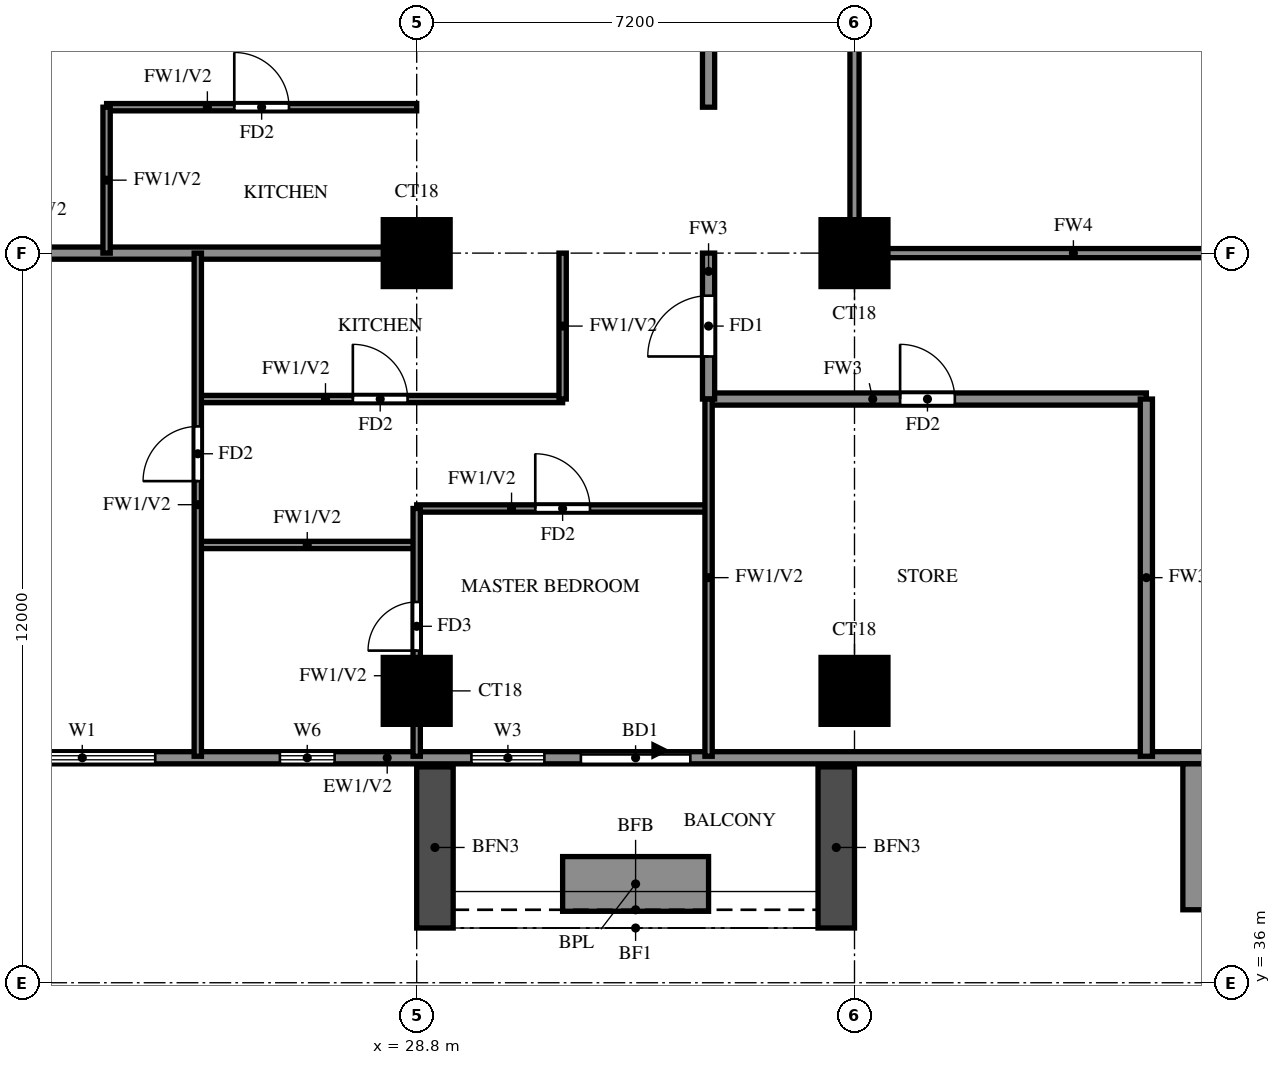
"""IFC4 building model, lengths in metres.
Left out: names, types, materials, properties, quantities, classifications, styles, units other than length and angle.
Written with IfcOpenShell. Run it as: python <this file> out.ifc"""

import sys

from ifc_helpers import new_model, si_unit, direction, frame, frame_2d, origin, origin_2d, place, context, subcontext, project, spatial, rectangle, extrude, source, transform, mapped, element, fill, save


model = new_model("IFC4")
c1 = context("Model", 3, precision=1e-05, world=origin(), true_north=direction((0.0, 1.0)))
c2 = subcontext(c1, "Body", "Model", "MODEL_VIEW")
j1 = project(units=[si_unit("LENGTHUNIT", "METRE"), si_unit("PLANEANGLEUNIT", "RADIAN")], contexts=[c1])
p1 = place(None, origin())
s1 = spatial("IfcSite", under=j1, at=p1, CompositionType="ELEMENT")
p2 = place(p1, origin())
s2 = spatial("IfcBuilding", under=s1, at=p2, CompositionType="ELEMENT")
p3 = place(p2, frame((0.0, 0.0, 127.0)))
s3 = spatial("IfcBuildingStorey", under=s2, at=p3, CompositionType="ELEMENT", Elevation=127.0)
m1 = source(origin(), c2, "Body", "SweptSolid", [
    extrude(rectangle(XDim=1.1, YDim=1.1, at=origin_2d()), origin(), (0.0, 0.0, 1.0), 3.2),
])
for number, where, z_axis, x_axis in (
    (1, (28.8, 40.8, 0.0), (0.0, 0.0, 1.0), (1.0, 0.0, 0.0)),
    (2, (36.0, 40.8, 0.0), (0.0, 0.0, 1.0), (1.0, 0.0, 0.0)),
    (3, (28.8, 48.0, 0.0), (0.0, 0.0, 1.0), (1.0, 0.0, 0.0)),
    (4, (36.0, 48.0, 0.0), (0.0, 0.0, 1.0), (1.0, 0.0, 0.0)),
):
    element("IfcColumn", number, at=place(p3, frame(where, z_axis=z_axis, x_axis=x_axis)), inside=s3, PredefinedType="COLUMN", context=c2, shape_type="MappedRepresentation", body=[
        mapped(m1, transform((0.0, 0.0, 0.0))),
    ])
p4 = place(p3, frame((18.2, 39.7, 0.0), z_axis=(0.0, 0.0, 1.0), x_axis=(1.0, 0.0, 0.0)))
e5 = element("IfcWall", 5, at=p4, inside=s3, PredefinedType="SOLIDWALL", context=c2, shape_type="SweptSolid", body=[
    extrude(rectangle(XDim=23.8, YDim=0.2, at=frame_2d((11.9, 0.0))), origin(), (0.0, 0.0, 1.0), 3.2),
])
p5 = place(p4, frame((13.3, 0.0, 0.0)))
e6 = element("IfcOpeningElement", 6, at=p5, cuts=e5, PredefinedType="OPENING", context=c2, shape_type="SweptSolid", body=[
    extrude(rectangle(XDim=1.8, YDim=2.4, at=frame_2d((0.9, 1.2))), frame((0.0, 0.11, 0.0), z_axis=(0.0, -1.0, 0.0), x_axis=(1.0, 0.0, 0.0)), (0.0, 0.0, 1.0), 0.22),
])
p6 = place(p4, frame((0.9, 0.0, 0.6)))
e7 = element("IfcOpeningElement", 7, at=p6, cuts=e5, PredefinedType="OPENING", context=c2, shape_type="SweptSolid", body=[
    extrude(rectangle(XDim=2.4, YDim=2.4, at=frame_2d((1.2, 1.2))), frame((0.0, 0.11, 0.0), z_axis=(0.0, -1.0, 0.0), x_axis=(1.0, 0.0, 0.0)), (0.0, 0.0, 1.0), 0.22),
])
p7 = place(p4, frame((3.9, 0.0, 0.6)))
e8 = element("IfcOpeningElement", 8, at=p7, cuts=e5, PredefinedType="OPENING", context=c2, shape_type="SweptSolid", body=[
    extrude(rectangle(XDim=2.4, YDim=2.4, at=frame_2d((1.2, 1.2))), frame((0.0, 0.11, 0.0), z_axis=(0.0, -1.0, 0.0), x_axis=(1.0, 0.0, 0.0)), (0.0, 0.0, 1.0), 0.22),
])
p8 = place(p4, frame((11.5, 0.0, 0.6)))
e9 = element("IfcOpeningElement", 9, at=p8, cuts=e5, PredefinedType="OPENING", context=c2, shape_type="SweptSolid", body=[
    extrude(rectangle(XDim=1.2, YDim=2.4, at=frame_2d((0.6, 1.2))), frame((0.0, 0.11, 0.0), z_axis=(0.0, -1.0, 0.0), x_axis=(1.0, 0.0, 0.0)), (0.0, 0.0, 1.0), 0.22),
])
p9 = place(p4, frame((8.35, 0.0, 1.5)))
e10 = element("IfcOpeningElement", 10, at=p9, cuts=e5, PredefinedType="OPENING", context=c2, shape_type="SweptSolid", body=[
    extrude(rectangle(XDim=0.9, YDim=0.9, at=frame_2d((0.45, 0.45))), frame((0.0, 0.11, 0.0), z_axis=(0.0, -1.0, 0.0), x_axis=(1.0, 0.0, 0.0)), (0.0, 0.0, 1.0), 0.22),
])
for number, where, z_axis, x_axis in (
    (11, (29.1, 39.55, 0.0), (0.0, 0.0, 1.0), (0.0, -1.0, 0.0)),
    (12, (35.7, 39.55, 0.0), (0.0, 0.0, 1.0), (0.0, -1.0, 0.0)),
):
    element("IfcWall", number, at=place(p3, frame(where, z_axis=z_axis, x_axis=x_axis)), inside=s3, PredefinedType="SOLIDWALL", context=c2, shape_type="SweptSolid", body=[
        extrude(rectangle(XDim=2.65, YDim=0.6, at=frame_2d((1.325, 0.0))), origin(), (0.0, 0.0, 1.0), 2.85),
    ])
p10 = place(p3, frame((31.2, 37.625, 0.0), z_axis=(0.0, 0.0, 1.0), x_axis=(1.0, 0.0, 0.0)))
e13 = element("IfcWall", 13, at=p10, inside=s3, PredefinedType="SOLIDWALL", context=c2, shape_type="SweptSolid", body=[
    extrude(rectangle(XDim=2.4, YDim=0.9, at=frame_2d((1.2, 0.0))), origin(), (0.0, 0.0, 1.0), 0.9),
])
p11 = place(p3, frame((42.3, 37.2, -0.3), z_axis=(0.0, 0.0, 1.0), x_axis=(0.0, 1.0, 0.0)))
e14 = element("IfcWall", 14, at=p11, inside=s3, PredefinedType="SOLIDWALL", context=c2, shape_type="SweptSolid", body=[
    extrude(rectangle(XDim=2.4, YDim=1.8, at=frame_2d((1.2, 0.0))), origin(), (0.0, 0.0, 1.0), 3.5),
])
p12 = place(p3, frame((33.6, 45.6, 0.0), z_axis=(0.0, 0.0, 1.0), x_axis=(1.0, 0.0, 0.0)))
e15 = element("IfcWall", 15, at=p12, inside=s3, PredefinedType="SOLIDWALL", context=c2, shape_type="SweptSolid", body=[
    extrude(rectangle(XDim=7.2, YDim=0.2, at=frame_2d((3.6, 0.0))), origin(), (0.0, 0.0, 1.0), 3.2),
])
p13 = place(p12, frame((3.15, 0.0, 0.0)))
e16 = element("IfcOpeningElement", 16, at=p13, cuts=e15, PredefinedType="OPENING", context=c2, shape_type="SweptSolid", body=[
    extrude(rectangle(XDim=0.9, YDim=2.1, at=frame_2d((0.45, 1.05))), frame((0.0, 0.11, 0.0), z_axis=(0.0, -1.0, 0.0), x_axis=(1.0, 0.0, 0.0)), (0.0, 0.0, 1.0), 0.22),
])
p14 = place(p3, frame((33.6, 45.6, 0.0), z_axis=(0.0, 0.0, 1.0), x_axis=(0.0, 1.0, 0.0)))
e17 = element("IfcWall", 17, at=p14, inside=s3, PredefinedType="SOLIDWALL", context=c2, shape_type="SweptSolid", body=[
    extrude(rectangle(XDim=2.4, YDim=0.2, at=frame_2d((1.2, 0.0))), origin(), (0.0, 0.0, 1.0), 3.2),
])
p15 = place(p14, frame((0.7, 0.0, 0.0)))
e18 = element("IfcOpeningElement", 18, at=p15, cuts=e17, PredefinedType="OPENING", context=c2, shape_type="SweptSolid", body=[
    extrude(rectangle(XDim=1.0, YDim=2.1, at=frame_2d((0.5, 1.05))), frame((0.0, 0.11, 0.0), z_axis=(0.0, -1.0, 0.0), x_axis=(1.0, 0.0, 0.0)), (0.0, 0.0, 1.0), 0.22),
])
p16 = place(p3, frame((33.6, 50.4, 0.0), z_axis=(0.0, 0.0, 1.0), x_axis=(0.0, 1.0, 0.0)))
e19 = element("IfcWall", 19, at=p16, inside=s3, PredefinedType="SOLIDWALL", context=c2, shape_type="SweptSolid", body=[
    extrude(rectangle(XDim=6.0, YDim=0.2, at=frame_2d((3.0, 0.0))), origin(), (0.0, 0.0, 1.0), 3.2),
])
p17 = place(p3, frame((40.8, 39.725, 0.0), z_axis=(0.0, 0.0, 1.0), x_axis=(0.0, 1.0, 0.0)))
e20 = element("IfcWall", 20, at=p17, inside=s3, PredefinedType="SOLIDWALL", context=c2, shape_type="SweptSolid", body=[
    extrude(rectangle(XDim=5.875, YDim=0.2, at=frame_2d((2.938, 0.0))), origin(), (0.0, 0.0, 1.0), 3.2),
])
p18 = place(p3, frame((14.525, 48.0, 0.0), z_axis=(0.0, 0.0, 1.0), x_axis=(1.0, 0.0, 0.0)))
e21 = element("IfcWall", 21, at=p18, inside=s3, PredefinedType="SOLIDWALL", context=c2, shape_type="SweptSolid", body=[
    extrude(rectangle(XDim=14.275, YDim=0.2, at=frame_2d((7.138, 0.0))), origin(), (0.0, 0.0, 1.0), 3.2),
])
p19 = place(p3, frame((25.2, 43.2, 0.0), z_axis=(0.0, 0.0, 1.0), x_axis=(1.0, 0.0, 0.0)))
e22 = element("IfcWall", 22, at=p19, inside=s3, PredefinedType="PARTITIONING", context=c2, shape_type="SweptSolid", body=[
    extrude(rectangle(XDim=3.6, YDim=0.12, at=frame_2d((1.8, 0.0))), origin(), (0.0, 0.0, 1.0), 3.2),
])
p20 = place(p3, frame((28.8, 43.8, 0.0), z_axis=(0.0, 0.0, 1.0), x_axis=(1.0, 0.0, 0.0)))
e23 = element("IfcWall", 23, at=p20, inside=s3, PredefinedType="PARTITIONING", context=c2, shape_type="SweptSolid", body=[
    extrude(rectangle(XDim=4.8, YDim=0.12, at=frame_2d((2.4, 0.0))), origin(), (0.0, 0.0, 1.0), 3.2),
])
p21 = place(p20, frame((1.95, 0.0, 0.0)))
e24 = element("IfcOpeningElement", 24, at=p21, cuts=e23, PredefinedType="OPENING", context=c2, shape_type="SweptSolid", body=[
    extrude(rectangle(XDim=0.9, YDim=2.1, at=frame_2d((0.45, 1.05))), frame((0.0, 0.07, 0.0), z_axis=(0.0, -1.0, 0.0), x_axis=(1.0, 0.0, 0.0)), (0.0, 0.0, 1.0), 0.14),
])
p22 = place(p3, frame((25.2, 45.6, 0.0), z_axis=(0.0, 0.0, 1.0), x_axis=(1.0, 0.0, 0.0)))
e25 = element("IfcWall", 25, at=p22, inside=s3, PredefinedType="PARTITIONING", context=c2, shape_type="SweptSolid", body=[
    extrude(rectangle(XDim=6.0, YDim=0.12, at=frame_2d((3.0, 0.0))), origin(), (0.0, 0.0, 1.0), 3.2),
])
p23 = place(p22, frame((2.55, 0.0, 0.0)))
e26 = element("IfcOpeningElement", 26, at=p23, cuts=e25, PredefinedType="OPENING", context=c2, shape_type="SweptSolid", body=[
    extrude(rectangle(XDim=0.9, YDim=2.1, at=frame_2d((0.45, 1.05))), frame((0.0, 0.07, 0.0), z_axis=(0.0, -1.0, 0.0), x_axis=(1.0, 0.0, 0.0)), (0.0, 0.0, 1.0), 0.14),
])
p24 = place(p3, frame((23.7, 50.4, 0.0), z_axis=(0.0, 0.0, 1.0), x_axis=(1.0, 0.0, 0.0)))
e27 = element("IfcWall", 27, at=p24, inside=s3, PredefinedType="PARTITIONING", context=c2, shape_type="SweptSolid", body=[
    extrude(rectangle(XDim=5.1, YDim=0.12, at=frame_2d((2.55, 0.0))), origin(), (0.0, 0.0, 1.0), 3.2),
])
p25 = place(p24, frame((2.1, 0.0, 0.0)))
e28 = element("IfcOpeningElement", 28, at=p25, cuts=e27, PredefinedType="OPENING", context=c2, shape_type="SweptSolid", body=[
    extrude(rectangle(XDim=0.9, YDim=2.1, at=frame_2d((0.45, 1.05))), frame((0.0, 0.07, 0.0), z_axis=(0.0, -1.0, 0.0), x_axis=(1.0, 0.0, 0.0)), (0.0, 0.0, 1.0), 0.14),
])
p26 = place(p3, frame((23.7, 48.0, 0.0), z_axis=(0.0, 0.0, 1.0), x_axis=(0.0, 1.0, 0.0)))
e29 = element("IfcWall", 29, at=p26, inside=s3, PredefinedType="PARTITIONING", context=c2, shape_type="SweptSolid", body=[
    extrude(rectangle(XDim=2.4, YDim=0.12, at=frame_2d((1.2, 0.0))), origin(), (0.0, 0.0, 1.0), 3.2),
])
p27 = place(p3, frame((25.2, 39.725, 0.0), z_axis=(0.0, 0.0, 1.0), x_axis=(0.0, 1.0, 0.0)))
e30 = element("IfcWall", 30, at=p27, inside=s3, PredefinedType="PARTITIONING", context=c2, shape_type="SweptSolid", body=[
    extrude(rectangle(XDim=8.275, YDim=0.12, at=frame_2d((4.137, 0.0))), origin(), (0.0, 0.0, 1.0), 3.2),
])
p28 = place(p27, frame((4.525, 0.0, 0.0)))
e31 = element("IfcOpeningElement", 31, at=p28, cuts=e30, PredefinedType="OPENING", context=c2, shape_type="SweptSolid", body=[
    extrude(rectangle(XDim=0.9, YDim=2.1, at=frame_2d((0.45, 1.05))), frame((0.0, 0.07, 0.0), z_axis=(0.0, -1.0, 0.0), x_axis=(1.0, 0.0, 0.0)), (0.0, 0.0, 1.0), 0.14),
])
p29 = place(p3, frame((28.8, 39.725, 0.0), z_axis=(0.0, 0.0, 1.0), x_axis=(0.0, 1.0, 0.0)))
e32 = element("IfcWall", 32, at=p29, inside=s3, PredefinedType="PARTITIONING", context=c2, shape_type="SweptSolid", body=[
    extrude(rectangle(XDim=4.075, YDim=0.12, at=frame_2d((2.038, 0.0))), origin(), (0.0, 0.0, 1.0), 3.2),
])
p30 = place(p29, frame((1.738, 0.0, 0.0)))
e33 = element("IfcOpeningElement", 33, at=p30, cuts=e32, PredefinedType="OPENING", context=c2, shape_type="SweptSolid", body=[
    extrude(rectangle(XDim=0.8, YDim=2.1, at=frame_2d((0.4, 1.05))), frame((0.0, 0.07, 0.0), z_axis=(0.0, -1.0, 0.0), x_axis=(1.0, 0.0, 0.0)), (0.0, 0.0, 1.0), 0.14),
])
p31 = place(p3, frame((31.2, 45.6, 0.0), z_axis=(0.0, 0.0, 1.0), x_axis=(0.0, 1.0, 0.0)))
e34 = element("IfcWall", 34, at=p31, inside=s3, PredefinedType="PARTITIONING", context=c2, shape_type="SweptSolid", body=[
    extrude(rectangle(XDim=2.4, YDim=0.12, at=frame_2d((1.2, 0.0))), origin(), (0.0, 0.0, 1.0), 3.2),
])
p32 = place(p3, frame((33.6, 39.725, 0.0), z_axis=(0.0, 0.0, 1.0), x_axis=(0.0, 1.0, 0.0)))
e35 = element("IfcWall", 35, at=p32, inside=s3, PredefinedType="PARTITIONING", context=c2, shape_type="SweptSolid", body=[
    extrude(rectangle(XDim=5.875, YDim=0.12, at=frame_2d((2.938, 0.0))), origin(), (0.0, 0.0, 1.0), 3.2),
])
p33 = place(p3, frame((36.0, 48.0, 0.0), z_axis=(0.0, 0.0, 1.0), x_axis=(1.0, 0.0, 0.0)))
e36 = element("IfcWall", 36, at=p33, inside=s3, PredefinedType="SOLIDWALL", context=c2, shape_type="SweptSolid", body=[
    extrude(rectangle(XDim=7.2, YDim=0.15, at=frame_2d((3.6, 0.0))), origin(), (0.0, 0.0, 1.0), 2.3),
])
p34 = place(p3, frame((36.0, 48.0, 0.0), z_axis=(0.0, 0.0, 1.0), x_axis=(0.0, 1.0, 0.0)))
e37 = element("IfcWall", 37, at=p34, inside=s3, PredefinedType="SOLIDWALL", context=c2, shape_type="SweptSolid", body=[
    extrude(rectangle(XDim=14.4, YDim=0.15, at=frame_2d((7.2, 0.0))), origin(), (0.0, 0.0, 1.0), 2.3),
])
p35 = place(p5, origin())
e38 = element("IfcDoor", 38, at=p35, inside=s3, OperationType="DOUBLE_DOOR_SLIDING", PredefinedType="DOOR", context=c2, shape_type="SweptSolid", body=[
    extrude(rectangle(XDim=1.8, YDim=2.4, at=frame_2d((0.9, 1.2))), frame((0.0, 0.025, 0.0), z_axis=(0.0, -1.0, 0.0), x_axis=(1.0, 0.0, 0.0)), (0.0, 0.0, 1.0), 0.05),
])
fill(e6, e38)
p36 = place(p7, origin())
e39 = element("IfcWindow", 39, at=p36, inside=s3, PartitioningType="DOUBLE_PANEL_VERTICAL", PredefinedType="WINDOW", context=c2, shape_type="SweptSolid", body=[
    extrude(rectangle(XDim=2.4, YDim=2.4, at=frame_2d((1.2, 1.2))), frame((0.0, 0.03, 0.0), z_axis=(0.0, -1.0, 0.0), x_axis=(1.0, 0.0, 0.0)), (0.0, 0.0, 1.0), 0.06),
])
fill(e8, e39)
p37 = place(p8, origin())
e40 = element("IfcWindow", 40, at=p37, inside=s3, PartitioningType="SINGLE_PANEL", PredefinedType="WINDOW", context=c2, shape_type="SweptSolid", body=[
    extrude(rectangle(XDim=1.2, YDim=2.4, at=frame_2d((0.6, 1.2))), frame((0.0, 0.03, 0.0), z_axis=(0.0, -1.0, 0.0), x_axis=(1.0, 0.0, 0.0)), (0.0, 0.0, 1.0), 0.06),
])
fill(e9, e40)
p38 = place(p9, origin())
e41 = element("IfcWindow", 41, at=p38, inside=s3, PartitioningType="SINGLE_PANEL", PredefinedType="WINDOW", context=c2, shape_type="SweptSolid", body=[
    extrude(rectangle(XDim=0.9, YDim=0.9, at=frame_2d((0.45, 0.45))), frame((0.0, 0.03, 0.0), z_axis=(0.0, -1.0, 0.0), x_axis=(1.0, 0.0, 0.0)), (0.0, 0.0, 1.0), 0.06),
])
fill(e10, e41)
p39 = place(p15, origin())
e42 = element("IfcDoor", 42, at=p39, inside=s3, OperationType="SINGLE_SWING_RIGHT", PredefinedType="DOOR", context=c2, shape_type="SweptSolid", body=[
    extrude(rectangle(XDim=1.0, YDim=2.1, at=frame_2d((0.5, 1.05))), frame((0.0, 0.025, 0.0), z_axis=(0.0, -1.0, 0.0), x_axis=(1.0, 0.0, 0.0)), (0.0, 0.0, 1.0), 0.05),
])
fill(e18, e42)
p40 = place(p28, origin())
e43 = element("IfcDoor", 43, at=p40, inside=s3, OperationType="SINGLE_SWING_LEFT", PredefinedType="DOOR", context=c2, shape_type="SweptSolid", body=[
    extrude(rectangle(XDim=0.9, YDim=2.1, at=frame_2d((0.45, 1.05))), frame((0.0, 0.025, 0.0), z_axis=(0.0, -1.0, 0.0), x_axis=(1.0, 0.0, 0.0)), (0.0, 0.0, 1.0), 0.05),
])
fill(e31, e43)
p41 = place(p21, origin())
e44 = element("IfcDoor", 44, at=p41, inside=s3, OperationType="SINGLE_SWING_LEFT", PredefinedType="DOOR", context=c2, shape_type="SweptSolid", body=[
    extrude(rectangle(XDim=0.9, YDim=2.1, at=frame_2d((0.45, 1.05))), frame((0.0, 0.025, 0.0), z_axis=(0.0, -1.0, 0.0), x_axis=(1.0, 0.0, 0.0)), (0.0, 0.0, 1.0), 0.05),
])
fill(e24, e44)
p42 = place(p30, origin())
e45 = element("IfcDoor", 45, at=p42, inside=s3, OperationType="SINGLE_SWING_LEFT", PredefinedType="DOOR", context=c2, shape_type="SweptSolid", body=[
    extrude(rectangle(XDim=0.8, YDim=2.1, at=frame_2d((0.4, 1.05))), frame((0.0, 0.025, 0.0), z_axis=(0.0, -1.0, 0.0), x_axis=(1.0, 0.0, 0.0)), (0.0, 0.0, 1.0), 0.05),
])
fill(e33, e45)
p43 = place(p23, origin())
e46 = element("IfcDoor", 46, at=p43, inside=s3, OperationType="SINGLE_SWING_LEFT", PredefinedType="DOOR", context=c2, shape_type="SweptSolid", body=[
    extrude(rectangle(XDim=0.9, YDim=2.1, at=frame_2d((0.45, 1.05))), frame((0.0, 0.025, 0.0), z_axis=(0.0, -1.0, 0.0), x_axis=(1.0, 0.0, 0.0)), (0.0, 0.0, 1.0), 0.05),
])
fill(e26, e46)
p44 = place(p13, origin())
e47 = element("IfcDoor", 47, at=p44, inside=s3, OperationType="SINGLE_SWING_LEFT", PredefinedType="DOOR", context=c2, shape_type="SweptSolid", body=[
    extrude(rectangle(XDim=0.9, YDim=2.1, at=frame_2d((0.45, 1.05))), frame((0.0, 0.025, 0.0), z_axis=(0.0, -1.0, 0.0), x_axis=(1.0, 0.0, 0.0)), (0.0, 0.0, 1.0), 0.05),
])
fill(e16, e47)
p45 = place(p25, origin())
e48 = element("IfcDoor", 48, at=p45, inside=s3, OperationType="SINGLE_SWING_RIGHT", PredefinedType="DOOR", context=c2, shape_type="SweptSolid", body=[
    extrude(rectangle(XDim=0.9, YDim=2.1, at=frame_2d((0.45, 1.05))), frame((0.0, 0.025, 0.0), z_axis=(0.0, -1.0, 0.0), x_axis=(1.0, 0.0, 0.0)), (0.0, 0.0, 1.0), 0.05),
])
fill(e28, e48)
save(model, sys.argv[1])
